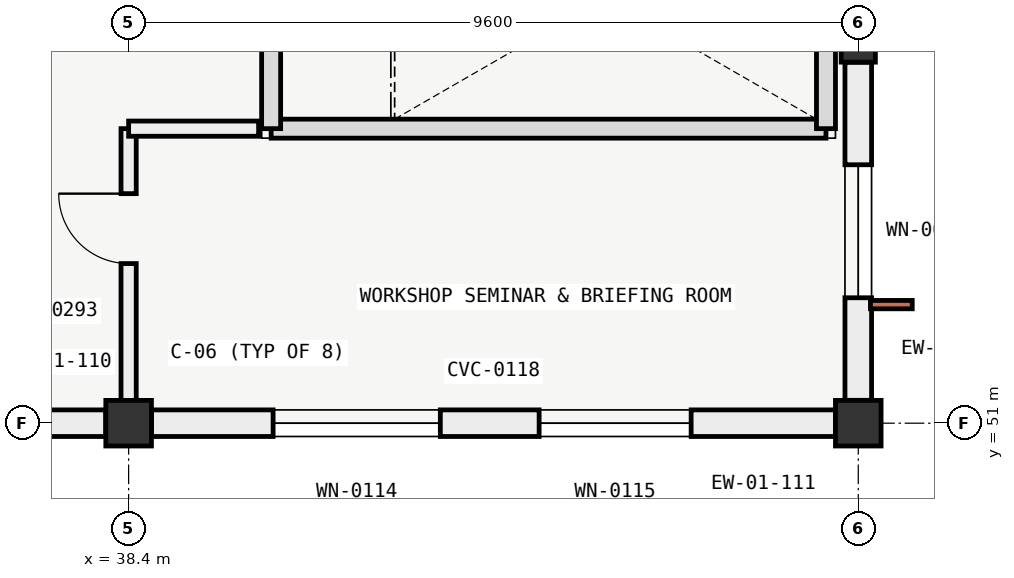
"""IFC4 building model, lengths in metres.
Left out: names, types, materials, properties, quantities, classifications, styles, units other than length and angle.
Written with IfcOpenShell. Run it as: python <this file> out.ifc"""

import sys

from ifc_helpers import new_model, si_unit, direction, frame, frame_2d, origin, origin_2d, place, context, subcontext, project, spatial, rectangle, extrude, element, fill, save


model = new_model("IFC4")
c1 = context("Model", 3, precision=1e-05, world=origin(), true_north=direction((0.0, 1.0)))
c2 = subcontext(c1, "Body", "Model", "MODEL_VIEW")
j1 = project(units=[si_unit("LENGTHUNIT", "METRE"), si_unit("PLANEANGLEUNIT", "RADIAN")], contexts=[c1])
p1 = place(None, origin())
s1 = spatial("IfcSite", under=j1, at=p1, CompositionType="ELEMENT")
p2 = place(p1, origin())
s2 = spatial("IfcBuilding", under=s1, at=p2, CompositionType="ELEMENT")
p3 = place(p2, frame((0.0, 0.0, 9.6)))
s3 = spatial("IfcBuildingStorey", under=s2, at=p3, CompositionType="ELEMENT", Elevation=9.6)
for number, where, z_axis, x_axis in (
    (1, (38.4, 51.0, 0.0), (0.0, 0.0, 1.0), (1.0, 0.0, 0.0)),
    (2, (48.0, 51.0, 0.0), (0.0, 0.0, 1.0), (1.0, 0.0, 0.0)),
):
    element("IfcColumn", number, at=place(p3, frame(where, z_axis=z_axis, x_axis=x_axis)), inside=s3, PredefinedType="COLUMN", context=c2, shape_type="SweptSolid", body=[
        extrude(rectangle(XDim=0.6, YDim=0.6, at=origin_2d()), origin(), (0.0, 0.0, 1.0), 4.2),
    ])
p4 = place(p3, frame((48.0, 56.1, 0.0), z_axis=(0.0, 0.0, 1.0), x_axis=(1.0, 0.0, 0.0)))
e3 = element("IfcColumn", 3, at=p4, inside=s3, PredefinedType="PILASTER", context=c2, shape_type="SweptSolid", body=[
    extrude(rectangle(XDim=0.45, YDim=0.7, at=origin_2d()), origin(), (0.0, 0.0, 1.0), 4.2),
])
p5 = place(p3, frame((48.0, 55.749, 0.0), z_axis=(0.0, 0.0, 1.0), x_axis=(0.0, -1.0, 0.0)))
e4 = element("IfcWall", 4, at=p5, inside=s3, PredefinedType="SOLIDWALL", context=c2, shape_type="SweptSolid", body=[
    extrude(rectangle(XDim=4.448, YDim=0.35, at=frame_2d((2.224, 0.0))), origin(), (0.0, 0.0, 1.0), 3.32),
])
p6 = place(p5, frame((1.349, 0.0, 0.95)))
e5 = element("IfcOpeningElement", 5, at=p6, cuts=e4, PredefinedType="OPENING", context=c2, shape_type="SweptSolid", body=[
    extrude(rectangle(XDim=1.75, YDim=2.05, at=frame_2d((0.875, 1.025))), frame((0.0, 0.185, 0.0), z_axis=(0.0, -1.0, 0.0), x_axis=(1.0, 0.0, 0.0)), (0.0, 0.0, 1.0), 0.37),
])
p7 = place(p3, frame((38.099, 51.0, 0.0), z_axis=(0.0, 0.0, 1.0), x_axis=(-1.0, 0.0, 0.0)))
e6 = element("IfcWall", 6, at=p7, inside=s3, PredefinedType="SOLIDWALL", context=c2, shape_type="SweptSolid", body=[
    extrude(rectangle(XDim=2.699, YDim=0.35, at=frame_2d((1.35, 0.0))), origin(), (0.0, 0.0, 1.0), 3.32),
])
p8 = place(p7, frame((0.899, 0.0, 0.85)))
e7 = element("IfcOpeningElement", 7, at=p8, cuts=e6, PredefinedType="OPENING", context=c2, shape_type="SweptSolid", body=[
    extrude(rectangle(XDim=0.9, YDim=2.2, at=frame_2d((0.45, 1.1))), frame((0.0, 0.185, 0.0), z_axis=(0.0, -1.0, 0.0), x_axis=(1.0, 0.0, 0.0)), (0.0, 0.0, 1.0), 0.37),
])
p9 = place(p3, frame((47.699, 51.0, 0.0), z_axis=(0.0, 0.0, 1.0), x_axis=(-1.0, 0.0, 0.0)))
e8 = element("IfcWall", 8, at=p9, inside=s3, PredefinedType="SOLIDWALL", context=c2, shape_type="SweptSolid", body=[
    extrude(rectangle(XDim=8.998, YDim=0.35, at=frame_2d((4.499, 0.0))), origin(), (0.0, 0.0, 1.0), 3.32),
])
p10 = place(p9, frame((5.198, 0.0, 0.85)))
e9 = element("IfcOpeningElement", 9, at=p10, cuts=e8, PredefinedType="OPENING", context=c2, shape_type="SweptSolid", body=[
    extrude(rectangle(XDim=2.2, YDim=2.3, at=frame_2d((1.1, 1.15))), frame((0.0, 0.185, 0.0), z_axis=(0.0, -1.0, 0.0), x_axis=(1.0, 0.0, 0.0)), (0.0, 0.0, 1.0), 0.37),
])
p11 = place(p9, frame((1.898, 0.0, 0.85)))
e10 = element("IfcOpeningElement", 10, at=p11, cuts=e8, PredefinedType="OPENING", context=c2, shape_type="SweptSolid", body=[
    extrude(rectangle(XDim=2.0, YDim=1.35, at=frame_2d((1.0, 0.675))), frame((0.0, 0.185, 0.0), z_axis=(0.0, -1.0, 0.0), x_axis=(1.0, 0.0, 0.0)), (0.0, 0.0, 1.0), 0.37),
])
p12 = place(p3, frame((40.275, 54.875, 0.0), z_axis=(0.0, 0.0, 1.0), x_axis=(1.0, 0.0, 0.0)))
e11 = element("IfcWall", 11, at=p12, inside=s3, PredefinedType="SOLIDWALL", context=c2, shape_type="SweptSolid", body=[
    extrude(rectangle(XDim=7.3, YDim=0.25, at=frame_2d((3.65, 0.0))), origin(), (0.0, 0.0, 1.0), 3.15),
])
p13 = place(p3, frame((47.575, 54.875, 0.0), z_axis=(0.0, 0.0, 1.0), x_axis=(0.0, 1.0, 0.0)))
e12 = element("IfcWall", 12, at=p13, inside=s3, PredefinedType="SOLIDWALL", context=c2, shape_type="SweptSolid", body=[
    extrude(rectangle(XDim=3.45, YDim=0.25, at=frame_2d((1.725, 0.0))), origin(), (0.0, 0.0, 1.0), 3.15),
])
p14 = place(p3, frame((40.275, 58.325, 0.0), z_axis=(0.0, 0.0, 1.0), x_axis=(0.0, -1.0, 0.0)))
e13 = element("IfcWall", 13, at=p14, inside=s3, PredefinedType="SOLIDWALL", context=c2, shape_type="SweptSolid", body=[
    extrude(rectangle(XDim=3.45, YDim=0.25, at=frame_2d((1.725, 0.0))), origin(), (0.0, 0.0, 1.0), 3.15),
])
p15 = place(p14, frame((1.175, 0.0, 0.0)))
e14 = element("IfcOpeningElement", 14, at=p15, cuts=e13, PredefinedType="OPENING", context=c2, shape_type="SweptSolid", body=[
    extrude(rectangle(XDim=1.1, YDim=2.2, at=frame_2d((0.55, 1.1))), frame((0.0, 0.135, 0.0), z_axis=(0.0, -1.0, 0.0), x_axis=(1.0, 0.0, 0.0)), (0.0, 0.0, 1.0), 0.27),
])
p16 = place(p3, frame((38.4, 51.15, 0.0), z_axis=(0.0, 0.0, 1.0), x_axis=(0.0, 1.0, 0.0)))
e15 = element("IfcWall", 15, at=p16, inside=s3, PredefinedType="PARTITIONING", context=c2, shape_type="SweptSolid", body=[
    extrude(rectangle(XDim=3.725, YDim=0.2, at=frame_2d((1.863, 0.0))), origin(), (0.0, 0.0, 1.0), 3.85),
])
p17 = place(p16, frame((1.95, 0.0, 0.0)))
e16 = element("IfcOpeningElement", 16, at=p17, cuts=e15, PredefinedType="OPENING", context=c2, shape_type="SweptSolid", body=[
    extrude(rectangle(XDim=0.92, YDim=2.1, at=frame_2d((0.46, 1.05))), frame((0.0, 0.11, 0.0), z_axis=(0.0, -1.0, 0.0), x_axis=(1.0, 0.0, 0.0)), (0.0, 0.0, 1.0), 0.22),
])
p18 = place(p3, frame((38.4, 54.875, 0.0), z_axis=(0.0, 0.0, 1.0), x_axis=(1.0, 0.0, 0.0)))
e17 = element("IfcWall", 17, at=p18, inside=s3, PredefinedType="PARTITIONING", context=c2, shape_type="SweptSolid", body=[
    extrude(rectangle(XDim=1.71, YDim=0.2, at=frame_2d((0.855, 0.0))), origin(), (0.0, 0.0, 1.0), 3.85),
])
p19 = place(p6, origin())
e18 = element("IfcWindow", 18, at=p19, inside=s3, PartitioningType="SINGLE_PANEL", PredefinedType="WINDOW", context=c2, shape_type="SweptSolid", body=[
    extrude(rectangle(XDim=1.75, YDim=2.05, at=frame_2d((0.875, 1.025))), frame((0.0, 0.03, 0.0), z_axis=(0.0, -1.0, 0.0), x_axis=(1.0, 0.0, 0.0)), (0.0, 0.0, 1.0), 0.06),
])
fill(e5, e18)
p20 = place(p10, origin())
e19 = element("IfcWindow", 19, at=p20, inside=s3, PartitioningType="SINGLE_PANEL", PredefinedType="WINDOW", context=c2, shape_type="SweptSolid", body=[
    extrude(rectangle(XDim=2.2, YDim=2.3, at=frame_2d((1.1, 1.15))), frame((0.0, 0.03, 0.0), z_axis=(0.0, -1.0, 0.0), x_axis=(1.0, 0.0, 0.0)), (0.0, 0.0, 1.0), 0.06),
])
fill(e9, e19)
p21 = place(p11, origin())
e20 = element("IfcWindow", 20, at=p21, inside=s3, PartitioningType="SINGLE_PANEL", PredefinedType="WINDOW", context=c2, shape_type="SweptSolid", body=[
    extrude(rectangle(XDim=2.0, YDim=1.35, at=frame_2d((1.0, 0.675))), frame((0.0, 0.03, 0.0), z_axis=(0.0, -1.0, 0.0), x_axis=(1.0, 0.0, 0.0)), (0.0, 0.0, 1.0), 0.06),
])
fill(e10, e20)
p22 = place(p17, origin())
e21 = element("IfcDoor", 21, at=p22, inside=s3, OperationType="SINGLE_SWING_RIGHT", PredefinedType="DOOR", context=c2, shape_type="SweptSolid", body=[
    extrude(rectangle(XDim=0.92, YDim=2.1, at=frame_2d((0.46, 1.05))), frame((0.0, 0.025, 0.0), z_axis=(0.0, -1.0, 0.0), x_axis=(1.0, 0.0, 0.0)), (0.0, 0.0, 1.0), 0.05),
])
fill(e16, e21)
save(model, sys.argv[1])
